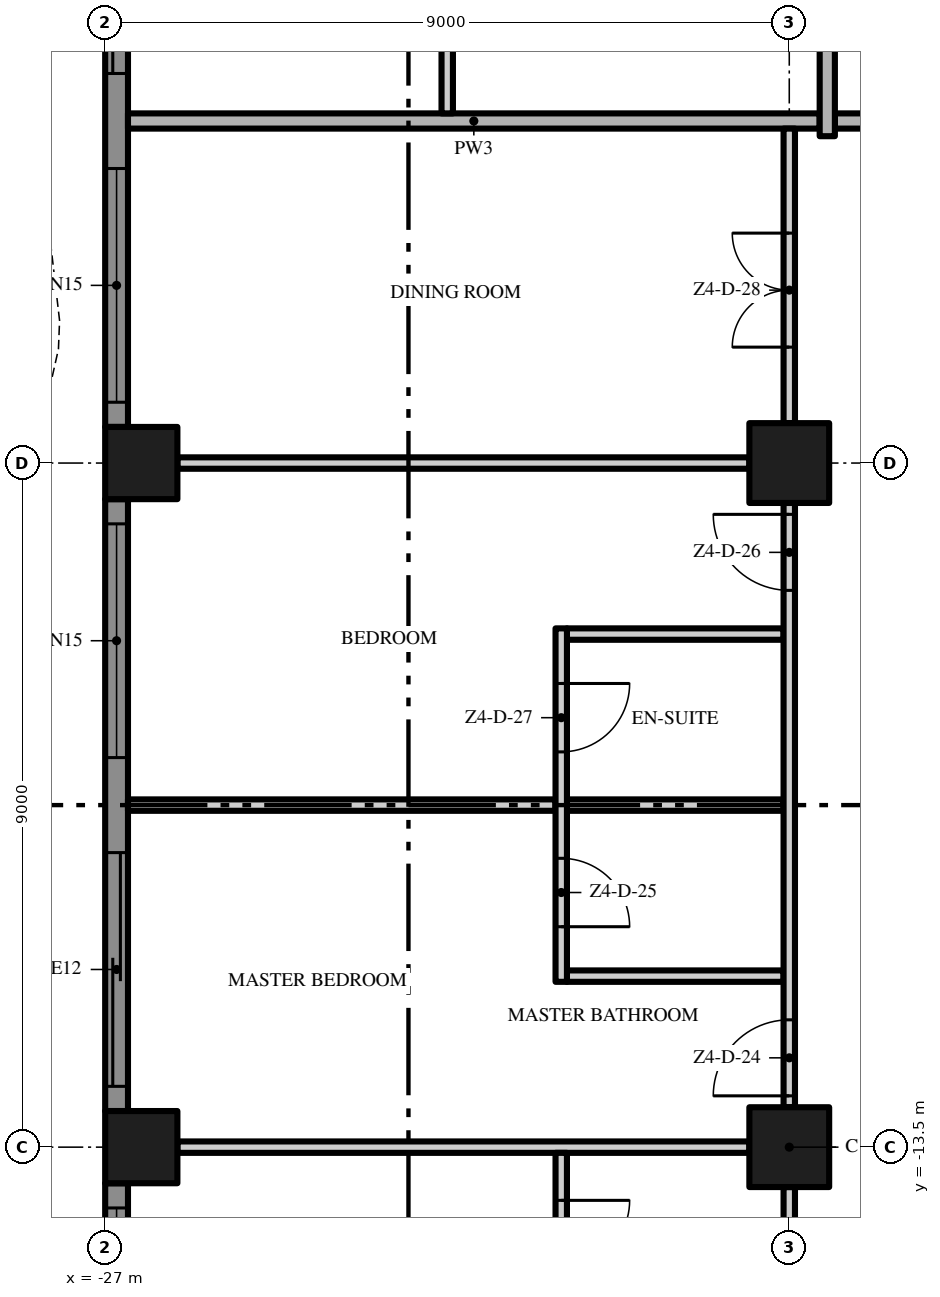
"""IFC4 building model, lengths in metres.
Left out: names, types, materials, properties, quantities, classifications, styles, units other than length and angle.
Written with IfcOpenShell. Run it as: python <this file> out.ifc"""

import sys

from ifc_helpers import new_model, si_unit, direction, frame, frame_2d, origin, origin_2d, place, context, subcontext, project, spatial, polyline, rectangle, outline, extrude, element, fill, save


model = new_model("IFC4")
c1 = context("Model", 3, precision=1e-05, world=origin(), true_north=direction((0.0, 1.0)))
c2 = subcontext(c1, "Body", "Model", "MODEL_VIEW")
j1 = project(units=[si_unit("LENGTHUNIT", "METRE"), si_unit("PLANEANGLEUNIT", "RADIAN")], contexts=[c1])
p1 = place(None, origin())
s1 = spatial("IfcSite", under=j1, at=p1, CompositionType="ELEMENT")
p2 = place(p1, origin())
s2 = spatial("IfcBuilding", under=s1, at=p2, CompositionType="ELEMENT")
p3 = place(p2, frame((0.0, 0.0, 222.4)))
s3 = spatial("IfcBuildingStorey", under=s2, at=p3, CompositionType="ELEMENT", Elevation=222.4)
for number, where, z_axis, x_axis in (
    (1, (-18.0, -13.5, 0.0), (0.0, 0.0, 1.0), (1.0, 0.0, 0.0)),
    (2, (-18.0, -4.5, 0.0), (0.0, 0.0, 1.0), (1.0, 0.0, 0.0)),
):
    element("IfcColumn", number, at=place(p3, frame(where, z_axis=z_axis, x_axis=x_axis)), inside=s3, PredefinedType="COLUMN", context=c2, shape_type="SweptSolid", body=[
        extrude(rectangle(XDim=1.05, YDim=1.05, at=origin_2d()), origin(), (0.0, 0.0, 1.0), 3.5),
    ])
for number, where, z_axis, x_axis in (
    (3, (-26.525, -13.5, 0.0), (0.0, 0.0, 1.0), (1.0, 0.0, 0.0)),
    (4, (-26.525, -4.5, 0.0), (0.0, 0.0, 1.0), (1.0, 0.0, 0.0)),
):
    element("IfcColumn", number, at=place(p3, frame(where, z_axis=z_axis, x_axis=x_axis)), inside=s3, PredefinedType="COLUMN", context=c2, shape_type="SweptSolid", body=[
        extrude(rectangle(XDim=0.95, YDim=0.95, at=origin_2d()), origin(), (0.0, 0.0, 1.0), 3.5),
    ])
p4 = place(p3, frame((-26.85, -4.025, 0.0), z_axis=(0.0, 0.0, 1.0), x_axis=(0.0, 1.0, 0.0)))
e5 = element("IfcWall", 5, at=p4, inside=s3, PredefinedType="SOLIDWALL", context=c2, shape_type="SweptSolid", body=[
    extrude(rectangle(XDim=8.05, YDim=0.3, at=frame_2d((4.025, 0.0))), origin(), (0.0, 0.0, 1.0), 3.5),
])
p5 = place(p4, frame((4.65, 0.0, 0.0)))
e6 = element("IfcOpeningElement", 6, at=p5, cuts=e5, PredefinedType="OPENING", context=c2, shape_type="SweptSolid", body=[
    extrude(rectangle(XDim=3.075, YDim=2.4, at=frame_2d((1.538, 1.2))), frame((0.0, 0.16, 0.0), z_axis=(0.0, -1.0, 0.0), x_axis=(1.0, 0.0, 0.0)), (0.0, 0.0, 1.0), 0.32),
])
p6 = place(p4, frame((0.325, 0.0, 0.45)))
e7 = element("IfcOpeningElement", 7, at=p6, cuts=e5, PredefinedType="OPENING", context=c2, shape_type="SweptSolid", body=[
    extrude(rectangle(XDim=3.075, YDim=2.65, at=frame_2d((1.538, 1.325))), frame((0.0, 0.16, 0.0), z_axis=(0.0, -1.0, 0.0), x_axis=(1.0, 0.0, 0.0)), (0.0, 0.0, 1.0), 0.32),
])
p7 = place(p3, frame((-26.85, -13.025, 0.0), z_axis=(0.0, 0.0, 1.0), x_axis=(0.0, 1.0, 0.0)))
e8 = element("IfcWall", 8, at=p7, inside=s3, PredefinedType="SOLIDWALL", context=c2, shape_type="SweptSolid", body=[
    extrude(rectangle(XDim=8.05, YDim=0.3, at=frame_2d((4.025, 0.0))), origin(), (0.0, 0.0, 1.0), 3.5),
])
p8 = place(p7, frame((4.65, 0.0, 0.45)))
e9 = element("IfcOpeningElement", 9, at=p8, cuts=e8, PredefinedType="OPENING", context=c2, shape_type="SweptSolid", body=[
    extrude(rectangle(XDim=3.075, YDim=2.65, at=frame_2d((1.538, 1.325))), frame((0.0, 0.16, 0.0), z_axis=(0.0, -1.0, 0.0), x_axis=(1.0, 0.0, 0.0)), (0.0, 0.0, 1.0), 0.32),
])
p9 = place(p7, frame((0.325, 0.0, 0.0)))
e10 = element("IfcOpeningElement", 10, at=p9, cuts=e8, PredefinedType="OPENING", context=c2, shape_type="SweptSolid", body=[
    extrude(rectangle(XDim=3.075, YDim=2.4, at=frame_2d((1.538, 1.2))), frame((0.0, 0.16, 0.0), z_axis=(0.0, -1.0, 0.0), x_axis=(1.0, 0.0, 0.0)), (0.0, 0.0, 1.0), 0.32),
])
p10 = place(p3, frame((-26.85, -18.0, 0.0), z_axis=(0.0, 0.0, 1.0), x_axis=(0.0, 1.0, 0.0)))
e11 = element("IfcWall", 11, at=p10, inside=s3, PredefinedType="SOLIDWALL", context=c2, shape_type="SweptSolid", body=[
    extrude(rectangle(XDim=4.025, YDim=0.3, at=frame_2d((2.013, 0.0))), origin(), (0.0, 0.0, 1.0), 3.5),
])
p11 = place(p10, frame((0.625, 0.0, 0.45)))
e12 = element("IfcOpeningElement", 12, at=p11, cuts=e11, PredefinedType="OPENING", context=c2, shape_type="SweptSolid", body=[
    extrude(rectangle(XDim=3.075, YDim=2.65, at=frame_2d((1.538, 1.325))), frame((0.0, 0.16, 0.0), z_axis=(0.0, -1.0, 0.0), x_axis=(1.0, 0.0, 0.0)), (0.0, 0.0, 1.0), 0.32),
])
p12 = place(p3, origin())
e13 = element("IfcWall", 13, at=p12, inside=s3, PredefinedType="USERDEFINED", context=c2, shape_type="SweptSolid", body=[
    extrude(outline(polyline([(-29.649, 18.0), (-28.988, 16.5), (-28.255, 15.0), (-27.731, 13.5), (-27.6, 12.375), (-27.615, 12.0), (-27.951, 10.5), (-28.612, 9.0), (-29.345, 7.5), (-29.869, 6.0), (-30.0, 4.875), (-29.985, 4.5), (-29.649, 3.0), (-28.988, 1.5), (-28.255, 0.0), (-27.731, -1.5), (-27.6, -2.625), (-27.615, -3.0), (-27.951, -4.5), (-28.612, -6.0), (-29.345, -7.5), (-29.869, -9.0), (-30.0, -10.125), (-29.985, -10.5), (-29.649, -12.0), (-28.988, -13.5), (-28.255, -15.0), (-27.731, -16.5), (-27.6, -17.625), (-27.615, -18.0), (-27.365, -18.01), (-27.349, -17.615), (-27.486, -16.444), (-28.024, -14.904), (-28.761, -13.395), (-29.41, -11.921), (-29.736, -10.467), (-29.749, -10.135), (-29.624, -9.056), (-29.114, -7.596), (-28.385, -6.105), (-27.713, -4.579), (-27.366, -3.033), (-27.349, -2.615), (-27.486, -1.444), (-28.024, 0.096), (-28.761, 1.605), (-29.41, 3.079), (-29.736, 4.533), (-29.749, 4.865), (-29.624, 5.944), (-29.114, 7.404), (-28.385, 8.895), (-27.713, 10.421), (-27.366, 11.967), (-27.349, 12.385), (-27.486, 13.556), (-28.024, 15.096), (-28.761, 16.605), (-29.42, 18.101), (-29.649, 18.0)])), origin(), (0.0, 0.0, 1.0), 0.9),
])
p13 = place(p3, frame((-26.05, -13.5, 0.0), z_axis=(0.0, 0.0, 1.0), x_axis=(1.0, 0.0, 0.0)))
e14 = element("IfcWall", 14, at=p13, inside=s3, PredefinedType="PARTITIONING", context=c2, shape_type="SweptSolid", body=[
    extrude(rectangle(XDim=7.525, YDim=0.15, at=frame_2d((3.763, 0.0))), origin(), (0.0, 0.0, 1.0), 3.5),
])
p14 = place(p3, frame((-20.925, -11.25, 0.0), z_axis=(0.0, 0.0, 1.0), x_axis=(1.0, 0.0, 0.0)))
e15 = element("IfcWall", 15, at=p14, inside=s3, PredefinedType="PARTITIONING", context=c2, shape_type="SweptSolid", body=[
    extrude(rectangle(XDim=2.85, YDim=0.15, at=frame_2d((1.425, 0.0))), origin(), (0.0, 0.0, 1.0), 3.5),
])
p15 = place(p3, frame((-26.7, -9.0, 0.0), z_axis=(0.0, 0.0, 1.0), x_axis=(1.0, 0.0, 0.0)))
e16 = element("IfcWall", 16, at=p15, inside=s3, PredefinedType="PARTITIONING", context=c2, shape_type="SweptSolid", body=[
    extrude(rectangle(XDim=5.625, YDim=0.15, at=frame_2d((2.812, 0.0))), origin(), (0.0, 0.0, 1.0), 3.5),
])
for number, where, z_axis, x_axis in (
    (17, (-20.925, -9.0, 0.0), (0.0, 0.0, 1.0), (1.0, 0.0, 0.0)),
    (18, (-20.925, -6.75, 0.0), (0.0, 0.0, 1.0), (1.0, 0.0, 0.0)),
):
    element("IfcWall", number, at=place(p3, frame(where, z_axis=z_axis, x_axis=x_axis)), inside=s3, PredefinedType="PARTITIONING", context=c2, shape_type="SweptSolid", body=[
        extrude(rectangle(XDim=2.85, YDim=0.15, at=frame_2d((1.425, 0.0))), origin(), (0.0, 0.0, 1.0), 3.5),
    ])
p16 = place(p3, frame((-26.05, -4.5, 0.0), z_axis=(0.0, 0.0, 1.0), x_axis=(1.0, 0.0, 0.0)))
e19 = element("IfcWall", 19, at=p16, inside=s3, PredefinedType="PARTITIONING", context=c2, shape_type="SweptSolid", body=[
    extrude(rectangle(XDim=7.525, YDim=0.15, at=frame_2d((3.763, 0.0))), origin(), (0.0, 0.0, 1.0), 3.5),
])
p17 = place(p3, frame((-17.4, 0.0, 0.0), z_axis=(0.0, 0.0, 1.0), x_axis=(1.0, 0.0, 0.0)))
e20 = element("IfcWall", 20, at=p17, inside=s3, PredefinedType="PARTITIONING", context=c2, shape_type="SweptSolid", body=[
    extrude(rectangle(XDim=12.8, YDim=0.2, at=frame_2d((6.4, 0.0))), origin(), (0.0, 0.0, 1.0), 3.5),
])
p18 = place(p3, frame((-26.7, 0.0, 0.0), z_axis=(0.0, 0.0, 1.0), x_axis=(1.0, 0.0, 0.0)))
e21 = element("IfcWall", 21, at=p18, inside=s3, PredefinedType="PARTITIONING", context=c2, shape_type="SweptSolid", body=[
    extrude(rectangle(XDim=9.1, YDim=0.2, at=frame_2d((4.55, 0.0))), origin(), (0.0, 0.0, 1.0), 3.5),
])
p19 = place(p3, frame((-22.5, 0.1, 0.0), z_axis=(0.0, 0.0, 1.0), x_axis=(0.0, 1.0, 0.0)))
e22 = element("IfcWall", 22, at=p19, inside=s3, PredefinedType="PARTITIONING", context=c2, shape_type="SweptSolid", body=[
    extrude(rectangle(XDim=17.425, YDim=0.15, at=frame_2d((8.713, 0.0))), origin(), (0.0, 0.0, 1.0), 3.5),
])
p20 = place(p19, frame((1.65, 0.0, 0.0)))
e23 = element("IfcOpeningElement", 23, at=p20, cuts=e22, PredefinedType="OPENING", context=c2, shape_type="SweptSolid", body=[
    extrude(rectangle(XDim=1.0, YDim=2.4, at=frame_2d((0.5, 1.2))), frame((0.0, 0.085, 0.0), z_axis=(0.0, -1.0, 0.0), x_axis=(1.0, 0.0, 0.0)), (0.0, 0.0, 1.0), 0.17),
])
p21 = place(p19, frame((7.25, 0.0, 0.0)))
e24 = element("IfcOpeningElement", 24, at=p21, cuts=e22, PredefinedType="OPENING", context=c2, shape_type="SweptSolid", body=[
    extrude(rectangle(XDim=1.0, YDim=2.4, at=frame_2d((0.5, 1.2))), frame((0.0, 0.085, 0.0), z_axis=(0.0, -1.0, 0.0), x_axis=(1.0, 0.0, 0.0)), (0.0, 0.0, 1.0), 0.17),
])
p22 = place(p19, frame((11.4, 0.0, 0.0)))
e25 = element("IfcOpeningElement", 25, at=p22, cuts=e22, PredefinedType="OPENING", context=c2, shape_type="SweptSolid", body=[
    extrude(rectangle(XDim=1.8, YDim=2.4, at=frame_2d((0.9, 1.2))), frame((0.0, 0.085, 0.0), z_axis=(0.0, -1.0, 0.0), x_axis=(1.0, 0.0, 0.0)), (0.0, 0.0, 1.0), 0.17),
])
p23 = place(p3, frame((-21.0, -13.575, 0.0), z_axis=(0.0, 0.0, 1.0), x_axis=(0.0, -1.0, 0.0)))
e26 = element("IfcWall", 26, at=p23, inside=s3, PredefinedType="PARTITIONING", context=c2, shape_type="SweptSolid", body=[
    extrude(rectangle(XDim=2.25, YDim=0.15, at=frame_2d((1.125, 0.0))), origin(), (0.0, 0.0, 1.0), 3.5),
])
p24 = place(p23, frame((0.625, 0.0, 0.0)))
e27 = element("IfcOpeningElement", 27, at=p24, cuts=e26, PredefinedType="OPENING", context=c2, shape_type="SweptSolid", body=[
    extrude(rectangle(XDim=0.9, YDim=2.1, at=frame_2d((0.45, 1.05))), frame((0.0, 0.085, 0.0), z_axis=(0.0, -1.0, 0.0), x_axis=(1.0, 0.0, 0.0)), (0.0, 0.0, 1.0), 0.17),
])
p25 = place(p3, frame((-21.0, -6.675, 0.0), z_axis=(0.0, 0.0, 1.0), x_axis=(0.0, -1.0, 0.0)))
e28 = element("IfcWall", 28, at=p25, inside=s3, PredefinedType="PARTITIONING", context=c2, shape_type="SweptSolid", body=[
    extrude(rectangle(XDim=4.65, YDim=0.15, at=frame_2d((2.325, 0.0))), origin(), (0.0, 0.0, 1.0), 3.5),
])
p26 = place(p25, frame((3.025, 0.0, 0.0)))
e29 = element("IfcOpeningElement", 29, at=p26, cuts=e28, PredefinedType="OPENING", context=c2, shape_type="SweptSolid", body=[
    extrude(rectangle(XDim=0.9, YDim=2.1, at=frame_2d((0.45, 1.05))), frame((0.0, 0.085, 0.0), z_axis=(0.0, -1.0, 0.0), x_axis=(1.0, 0.0, 0.0)), (0.0, 0.0, 1.0), 0.17),
])
p27 = place(p25, frame((0.725, 0.0, 0.0)))
e30 = element("IfcOpeningElement", 30, at=p27, cuts=e28, PredefinedType="OPENING", context=c2, shape_type="SweptSolid", body=[
    extrude(rectangle(XDim=0.9, YDim=2.1, at=frame_2d((0.45, 1.05))), frame((0.0, 0.085, 0.0), z_axis=(0.0, -1.0, 0.0), x_axis=(1.0, 0.0, 0.0)), (0.0, 0.0, 1.0), 0.17),
])
p28 = place(p3, frame((-18.0, -21.55, 0.0), z_axis=(0.0, 0.0, 1.0), x_axis=(0.0, 1.0, 0.0)))
e31 = element("IfcWall", 31, at=p28, inside=s3, PredefinedType="PARTITIONING", context=c2, shape_type="SweptSolid", body=[
    extrude(rectangle(XDim=7.525, YDim=0.15, at=frame_2d((3.763, 0.0))), origin(), (0.0, 0.0, 1.0), 3.5),
])
p29 = place(p28, frame((1.5, 0.0, 0.0)))
e32 = element("IfcOpeningElement", 32, at=p29, cuts=e31, PredefinedType="OPENING", context=c2, shape_type="SweptSolid", body=[
    extrude(rectangle(XDim=1.8, YDim=2.4, at=frame_2d((0.9, 1.2))), frame((0.0, 0.085, 0.0), z_axis=(0.0, -1.0, 0.0), x_axis=(1.0, 0.0, 0.0)), (0.0, 0.0, 1.0), 0.17),
])
p30 = place(p3, frame((-18.0, -12.975, 0.0), z_axis=(0.0, 0.0, 1.0), x_axis=(0.0, 1.0, 0.0)))
e33 = element("IfcWall", 33, at=p30, inside=s3, PredefinedType="PARTITIONING", context=c2, shape_type="SweptSolid", body=[
    extrude(rectangle(XDim=7.95, YDim=0.15, at=frame_2d((3.975, 0.0))), origin(), (0.0, 0.0, 1.0), 3.5),
])
p31 = place(p30, frame((0.15, 0.0, 0.0)))
e34 = element("IfcOpeningElement", 34, at=p31, cuts=e33, PredefinedType="OPENING", context=c2, shape_type="SweptSolid", body=[
    extrude(rectangle(XDim=1.0, YDim=2.4, at=frame_2d((0.5, 1.2))), frame((0.0, 0.085, 0.0), z_axis=(0.0, -1.0, 0.0), x_axis=(1.0, 0.0, 0.0)), (0.0, 0.0, 1.0), 0.17),
])
p32 = place(p30, frame((6.8, 0.0, 0.0)))
e35 = element("IfcOpeningElement", 35, at=p32, cuts=e33, PredefinedType="OPENING", context=c2, shape_type="SweptSolid", body=[
    extrude(rectangle(XDim=1.0, YDim=2.4, at=frame_2d((0.5, 1.2))), frame((0.0, 0.085, 0.0), z_axis=(0.0, -1.0, 0.0), x_axis=(1.0, 0.0, 0.0)), (0.0, 0.0, 1.0), 0.17),
])
p33 = place(p3, frame((-18.0, -3.975, 0.0), z_axis=(0.0, 0.0, 1.0), x_axis=(0.0, 1.0, 0.0)))
e36 = element("IfcWall", 36, at=p33, inside=s3, PredefinedType="PARTITIONING", context=c2, shape_type="SweptSolid", body=[
    extrude(rectangle(XDim=3.875, YDim=0.15, at=frame_2d((1.938, 0.0))), origin(), (0.0, 0.0, 1.0), 3.5),
])
p34 = place(p33, frame((1.0, 0.0, 0.0)))
e37 = element("IfcOpeningElement", 37, at=p34, cuts=e36, PredefinedType="OPENING", context=c2, shape_type="SweptSolid", body=[
    extrude(rectangle(XDim=1.5, YDim=2.4, at=frame_2d((0.75, 1.2))), frame((0.0, 0.085, 0.0), z_axis=(0.0, -1.0, 0.0), x_axis=(1.0, 0.0, 0.0)), (0.0, 0.0, 1.0), 0.17),
])
p35 = place(p3, frame((-17.5, -0.2, 0.0), z_axis=(0.0, 0.0, 1.0), x_axis=(0.0, 1.0, 0.0)))
e38 = element("IfcWall", 38, at=p35, inside=s3, PredefinedType="PARTITIONING", context=c2, shape_type="SweptSolid", body=[
    extrude(rectangle(XDim=4.175, YDim=0.2, at=frame_2d((2.087, 0.0))), origin(), (0.0, 0.0, 1.0), 3.5),
])
p36 = place(p5, origin())
e39 = element("IfcDoor", 39, at=p36, inside=s3, OperationType="SINGLE_SWING_LEFT", PredefinedType="DOOR", context=c2, shape_type="SweptSolid", body=[
    extrude(rectangle(XDim=3.075, YDim=2.4, at=frame_2d((1.538, 1.2))), frame((0.0, 0.025, 0.0), z_axis=(0.0, -1.0, 0.0), x_axis=(1.0, 0.0, 0.0)), (0.0, 0.0, 1.0), 0.05),
])
fill(e6, e39)
p37 = place(p6, origin())
e40 = element("IfcWindow", 40, at=p37, inside=s3, PartitioningType="SINGLE_PANEL", PredefinedType="WINDOW", context=c2, shape_type="SweptSolid", body=[
    extrude(rectangle(XDim=3.075, YDim=2.65, at=frame_2d((1.538, 1.325))), frame((0.0, 0.03, 0.0), z_axis=(0.0, -1.0, 0.0), x_axis=(1.0, 0.0, 0.0)), (0.0, 0.0, 1.0), 0.06),
])
fill(e7, e40)
p38 = place(p8, origin())
e41 = element("IfcWindow", 41, at=p38, inside=s3, PartitioningType="SINGLE_PANEL", PredefinedType="WINDOW", context=c2, shape_type="SweptSolid", body=[
    extrude(rectangle(XDim=3.075, YDim=2.65, at=frame_2d((1.538, 1.325))), frame((0.0, 0.03, 0.0), z_axis=(0.0, -1.0, 0.0), x_axis=(1.0, 0.0, 0.0)), (0.0, 0.0, 1.0), 0.06),
])
fill(e9, e41)
p39 = place(p9, origin())
e42 = element("IfcDoor", 42, at=p39, inside=s3, OperationType="SINGLE_SWING_LEFT", PredefinedType="DOOR", context=c2, shape_type="SweptSolid", body=[
    extrude(rectangle(XDim=3.075, YDim=2.4, at=frame_2d((1.538, 1.2))), frame((0.0, 0.025, 0.0), z_axis=(0.0, -1.0, 0.0), x_axis=(1.0, 0.0, 0.0)), (0.0, 0.0, 1.0), 0.05),
])
fill(e10, e42)
p40 = place(p11, origin())
e43 = element("IfcWindow", 43, at=p40, inside=s3, PartitioningType="SINGLE_PANEL", PredefinedType="WINDOW", context=c2, shape_type="SweptSolid", body=[
    extrude(rectangle(XDim=3.075, YDim=2.65, at=frame_2d((1.538, 1.325))), frame((0.0, 0.03, 0.0), z_axis=(0.0, -1.0, 0.0), x_axis=(1.0, 0.0, 0.0)), (0.0, 0.0, 1.0), 0.06),
])
fill(e12, e43)
p41 = place(p24, origin())
e44 = element("IfcDoor", 44, at=p41, inside=s3, OperationType="SINGLE_SWING_LEFT", PredefinedType="DOOR", context=c2, shape_type="SweptSolid", body=[
    extrude(rectangle(XDim=0.9, YDim=2.1, at=frame_2d((0.45, 1.05))), frame((0.0, 0.025, 0.0), z_axis=(0.0, -1.0, 0.0), x_axis=(1.0, 0.0, 0.0)), (0.0, 0.0, 1.0), 0.05),
])
fill(e27, e44)
p42 = place(p31, origin())
e45 = element("IfcDoor", 45, at=p42, inside=s3, OperationType="SINGLE_SWING_LEFT", PredefinedType="DOOR", context=c2, shape_type="SweptSolid", body=[
    extrude(rectangle(XDim=1.0, YDim=2.4, at=frame_2d((0.5, 1.2))), frame((0.0, 0.025, 0.0), z_axis=(0.0, -1.0, 0.0), x_axis=(1.0, 0.0, 0.0)), (0.0, 0.0, 1.0), 0.05),
])
fill(e34, e45)
p43 = place(p26, origin())
e46 = element("IfcDoor", 46, at=p43, inside=s3, OperationType="SINGLE_SWING_RIGHT", PredefinedType="DOOR", context=c2, shape_type="SweptSolid", body=[
    extrude(rectangle(XDim=0.9, YDim=2.1, at=frame_2d((0.45, 1.05))), frame((0.0, 0.025, 0.0), z_axis=(0.0, -1.0, 0.0), x_axis=(1.0, 0.0, 0.0)), (0.0, 0.0, 1.0), 0.05),
])
fill(e29, e46)
p44 = place(p32, origin())
e47 = element("IfcDoor", 47, at=p44, inside=s3, OperationType="SINGLE_SWING_RIGHT", PredefinedType="DOOR", context=c2, shape_type="SweptSolid", body=[
    extrude(rectangle(XDim=1.0, YDim=2.4, at=frame_2d((0.5, 1.2))), frame((0.0, 0.025, 0.0), z_axis=(0.0, -1.0, 0.0), x_axis=(1.0, 0.0, 0.0)), (0.0, 0.0, 1.0), 0.05),
])
fill(e35, e47)
p45 = place(p27, origin())
e48 = element("IfcDoor", 48, at=p45, inside=s3, OperationType="SINGLE_SWING_LEFT", PredefinedType="DOOR", context=c2, shape_type="SweptSolid", body=[
    extrude(rectangle(XDim=0.9, YDim=2.1, at=frame_2d((0.45, 1.05))), frame((0.0, 0.025, 0.0), z_axis=(0.0, -1.0, 0.0), x_axis=(1.0, 0.0, 0.0)), (0.0, 0.0, 1.0), 0.05),
])
fill(e30, e48)
p46 = place(p34, origin())
e49 = element("IfcDoor", 49, at=p46, inside=s3, OperationType="DOUBLE_DOOR_SINGLE_SWING", PredefinedType="DOOR", context=c2, shape_type="SweptSolid", body=[
    extrude(rectangle(XDim=1.5, YDim=2.4, at=frame_2d((0.75, 1.2))), frame((0.0, 0.025, 0.0), z_axis=(0.0, -1.0, 0.0), x_axis=(1.0, 0.0, 0.0)), (0.0, 0.0, 1.0), 0.05),
])
fill(e37, e49)
save(model, sys.argv[1])
